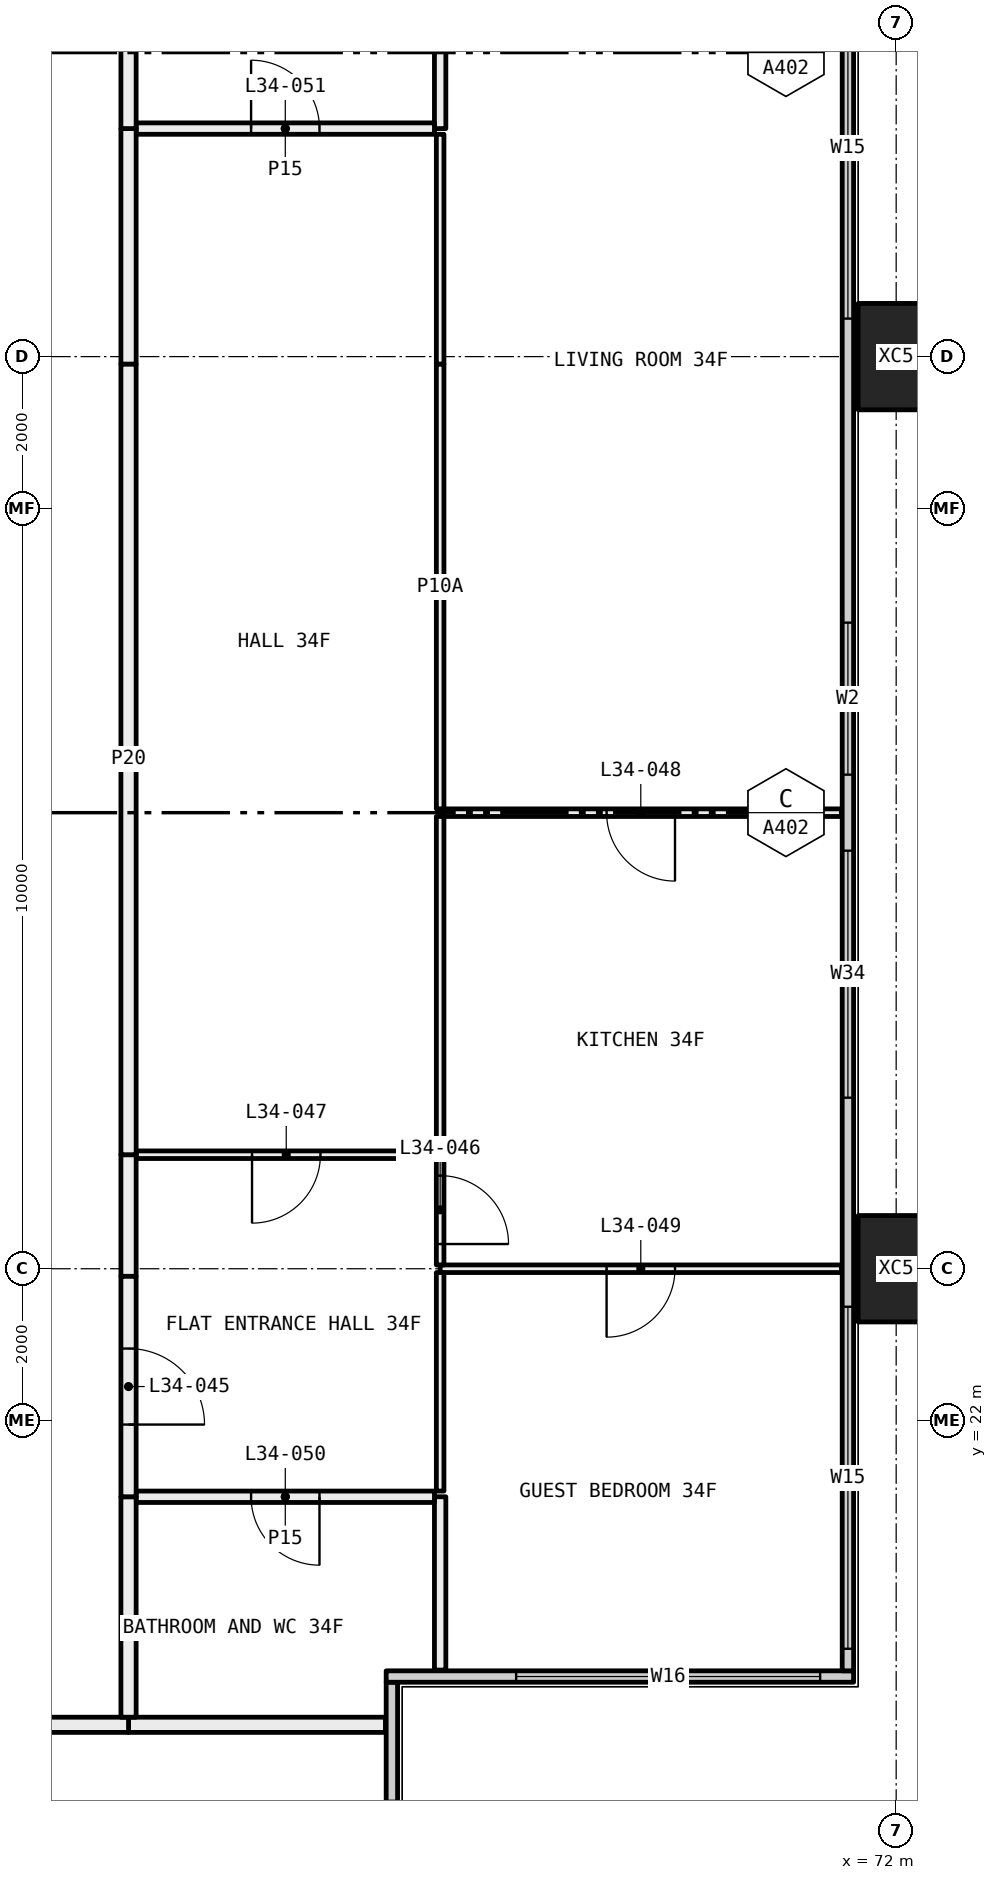
"""IFC4 building model, lengths in metres.
Left out: names, types, materials, properties, quantities, classifications, styles, units other than length and angle.
Written with IfcOpenShell. Run it as: python <this file> out.ifc"""

import sys

from ifc_helpers import new_model, si_unit, direction, frame, frame_2d, origin, origin_2d, place, context, subcontext, project, spatial, rectangle, hollow_rectangle, extrude, element, fill, save


model = new_model("IFC4")
c1 = context("Model", 3, precision=1e-05, world=origin(), true_north=direction((0.0, 1.0)))
c2 = subcontext(c1, "Body", "Model", "MODEL_VIEW")
j1 = project(units=[si_unit("LENGTHUNIT", "METRE"), si_unit("PLANEANGLEUNIT", "RADIAN")], contexts=[c1])
p1 = place(None, origin())
s1 = spatial("IfcSite", under=j1, at=p1, CompositionType="ELEMENT")
p2 = place(p1, origin())
s2 = spatial("IfcBuilding", under=s1, at=p2, CompositionType="ELEMENT")
p3 = place(p2, frame((0.0, 0.0, 131.1)))
s3 = spatial("IfcBuildingStorey", under=s2, at=p3, CompositionType="ELEMENT", Elevation=131.1)
for number, where, z_axis, x_axis in (
    (1, (72.0, 24.0, -0.4), (0.0, 0.0, 1.0), (0.0, 1.0, 0.0)),
    (2, (72.0, 36.0, -0.4), (0.0, 0.0, 1.0), (0.0, 1.0, 0.0)),
):
    element("IfcColumn", number, at=place(p3, frame(where, z_axis=z_axis, x_axis=x_axis)), inside=s3, PredefinedType="COLUMN", context=c2, shape_type="SweptSolid", body=[
        extrude(hollow_rectangle(XDim=1.4, YDim=1.0, WallThickness=0.055, at=origin_2d()), origin(), (0.0, 0.0, 1.0), 3.45),
    ])
p4 = place(p3, frame((65.365, 12.71, 0.0), z_axis=(0.0, 0.0, 1.0), x_axis=(0.0, 1.0, 0.0)))
e3 = element("IfcWall", 3, at=p4, inside=s3, PredefinedType="ELEMENTEDWALL", context=c2, shape_type="SweptSolid", body=[
    extrude(rectangle(XDim=5.85, YDim=0.15, at=frame_2d((2.925, 0.0))), origin(), (0.0, 0.0, 1.0), 3.05),
])
p5 = place(p4, frame((0.29, 0.0, 0.45)))
e4 = element("IfcOpeningElement", 4, at=p5, cuts=e3, PredefinedType="OPENING", context=c2, shape_type="SweptSolid", body=[
    extrude(rectangle(XDim=4.0, YDim=2.55, at=frame_2d((2.0, 1.275))), frame((0.0, 0.085, 0.0), z_axis=(0.0, -1.0, 0.0), x_axis=(1.0, 0.0, 0.0)), (0.0, 0.0, 1.0), 0.17),
])
p6 = place(p3, frame((65.29, 18.635, 0.0), z_axis=(0.0, 0.0, 1.0), x_axis=(1.0, 0.0, 0.0)))
e5 = element("IfcWall", 5, at=p6, inside=s3, PredefinedType="ELEMENTEDWALL", context=c2, shape_type="SweptSolid", body=[
    extrude(rectangle(XDim=6.15, YDim=0.15, at=frame_2d((3.075, 0.0))), origin(), (0.0, 0.0, 1.0), 3.05),
])
p7 = place(p6, frame((1.71, 0.0, 0.45)))
e6 = element("IfcOpeningElement", 6, at=p7, cuts=e5, PredefinedType="OPENING", context=c2, shape_type="SweptSolid", body=[
    extrude(rectangle(XDim=4.0, YDim=2.55, at=frame_2d((2.0, 1.275))), frame((0.0, 0.085, 0.0), z_axis=(0.0, -1.0, 0.0), x_axis=(1.0, 0.0, 0.0)), (0.0, 0.0, 1.0), 0.17),
])
p8 = place(p3, frame((71.365, 18.71, 0.0), z_axis=(0.0, 0.0, 1.0), x_axis=(0.0, 1.0, 0.0)))
e7 = element("IfcWall", 7, at=p8, inside=s3, PredefinedType="ELEMENTEDWALL", context=c2, shape_type="SweptSolid", body=[
    extrude(rectangle(XDim=22.58, YDim=0.15, at=frame_2d((11.29, 0.0))), origin(), (0.0, 0.0, 1.0), 3.05),
])
p9 = place(p8, frame((0.29, 0.0, 0.45)))
e8 = element("IfcOpeningElement", 8, at=p9, cuts=e7, PredefinedType="OPENING", context=c2, shape_type="SweptSolid", body=[
    extrude(rectangle(XDim=4.5, YDim=2.55, at=frame_2d((2.25, 1.275))), frame((0.0, 0.085, 0.0), z_axis=(0.0, -1.0, 0.0), x_axis=(1.0, 0.0, 0.0)), (0.0, 0.0, 1.0), 0.17),
])
p10 = place(p8, frame((7.54, 0.0, 0.45)))
e9 = element("IfcOpeningElement", 9, at=p10, cuts=e7, PredefinedType="OPENING", context=c2, shape_type="SweptSolid", body=[
    extrude(rectangle(XDim=3.25, YDim=2.55, at=frame_2d((1.625, 1.275))), frame((0.0, 0.085, 0.0), z_axis=(0.0, -1.0, 0.0), x_axis=(1.0, 0.0, 0.0)), (0.0, 0.0, 1.0), 0.17),
])
p11 = place(p8, frame((11.79, 0.0, 0.45)))
e10 = element("IfcOpeningElement", 10, at=p11, cuts=e7, PredefinedType="OPENING", context=c2, shape_type="SweptSolid", body=[
    extrude(rectangle(XDim=2.0, YDim=2.55, at=frame_2d((1.0, 1.275))), frame((0.0, 0.085, 0.0), z_axis=(0.0, -1.0, 0.0), x_axis=(1.0, 0.0, 0.0)), (0.0, 0.0, 1.0), 0.17),
])
p12 = place(p8, frame((17.79, 0.0, 0.45)))
e11 = element("IfcOpeningElement", 11, at=p12, cuts=e7, PredefinedType="OPENING", context=c2, shape_type="SweptSolid", body=[
    extrude(rectangle(XDim=4.5, YDim=2.55, at=frame_2d((2.25, 1.275))), frame((0.0, 0.085, 0.0), z_axis=(0.0, -1.0, 0.0), x_axis=(1.0, 0.0, 0.0)), (0.0, 0.0, 1.0), 0.17),
])
p13 = place(p3, frame((65.28, 18.0, 0.0), z_axis=(0.0, 0.0, 1.0), x_axis=(-1.0, 0.0, 0.0)))
e12 = element("IfcWall", 12, at=p13, inside=s3, PredefinedType="PARTITIONING", context=c2, shape_type="SweptSolid", body=[
    extrude(rectangle(XDim=3.38, YDim=0.2, at=frame_2d((1.69, 0.0))), origin(), (0.0, 0.0, 1.0), 3.05),
])
p14 = place(p3, frame((61.9, 18.0, 0.0), z_axis=(0.0, 0.0, 1.0), x_axis=(-1.0, 0.0, 0.0)))
e13 = element("IfcWall", 13, at=p14, inside=s3, PredefinedType="PARTITIONING", context=c2, shape_type="SweptSolid", body=[
    extrude(rectangle(XDim=1.9, YDim=0.2, at=frame_2d((0.95, 0.0))), origin(), (0.0, 0.0, 1.0), 3.05),
])
p15 = place(p3, frame((71.28, 24.0, 0.0), z_axis=(0.0, 0.0, 1.0), x_axis=(-1.0, 0.0, 0.0)))
e14 = element("IfcWall", 14, at=p15, inside=s3, PredefinedType="PARTITIONING", context=c2, shape_type="SweptSolid", body=[
    extrude(rectangle(XDim=5.28, YDim=0.1, at=frame_2d((2.64, 0.0))), origin(), (0.0, 0.0, 1.0), 2.45),
])
p16 = place(p15, frame((2.19, 0.0, 0.0)))
e15 = element("IfcOpeningElement", 15, at=p16, cuts=e14, PredefinedType="OPENING", context=c2, shape_type="SweptSolid", body=[
    extrude(rectangle(XDim=0.9, YDim=2.1, at=frame_2d((0.45, 1.05))), frame((0.0, 0.06, 0.0), z_axis=(0.0, -1.0, 0.0), x_axis=(1.0, 0.0, 0.0)), (0.0, 0.0, 1.0), 0.12),
])
p17 = place(p3, frame((66.0, 21.0, 0.0), z_axis=(0.0, 0.0, 1.0), x_axis=(0.0, -1.0, 0.0)))
e16 = element("IfcWall", 16, at=p17, inside=s3, PredefinedType="PARTITIONING", context=c2, shape_type="SweptSolid", body=[
    extrude(rectangle(XDim=2.28, YDim=0.15, at=frame_2d((1.14, 0.0))), origin(), (0.0, 0.0, 1.0), 3.05),
])
p18 = place(p3, frame((66.0, 23.95, 0.0), z_axis=(0.0, 0.0, 1.0), x_axis=(0.0, -1.0, 0.0)))
e17 = element("IfcWall", 17, at=p18, inside=s3, PredefinedType="PARTITIONING", context=c2, shape_type="SweptSolid", body=[
    extrude(rectangle(XDim=2.875, YDim=0.1, at=frame_2d((1.438, 0.0))), origin(), (0.0, 0.0, 1.0), 2.45),
])
p19 = place(p3, frame((71.28, 30.0, 0.0), z_axis=(0.0, 0.0, 1.0), x_axis=(-1.0, 0.0, 0.0)))
e18 = element("IfcWall", 18, at=p19, inside=s3, PredefinedType="PARTITIONING", context=c2, shape_type="SweptSolid", body=[
    extrude(rectangle(XDim=5.28, YDim=0.1, at=frame_2d((2.64, 0.0))), origin(), (0.0, 0.0, 1.0), 3.05),
])
p20 = place(p19, frame((2.19, 0.0, 0.0)))
e19 = element("IfcOpeningElement", 19, at=p20, cuts=e18, PredefinedType="OPENING", context=c2, shape_type="SweptSolid", body=[
    extrude(rectangle(XDim=0.9, YDim=2.1, at=frame_2d((0.45, 1.05))), frame((0.0, 0.06, 0.0), z_axis=(0.0, -1.0, 0.0), x_axis=(1.0, 0.0, 0.0)), (0.0, 0.0, 1.0), 0.12),
])
p21 = place(p3, frame((66.0, 25.5, 0.0), z_axis=(0.0, 0.0, 1.0), x_axis=(0.0, -1.0, 0.0)))
e20 = element("IfcWall", 20, at=p21, inside=s3, PredefinedType="PARTITIONING", context=c2, shape_type="SweptSolid", body=[
    extrude(rectangle(XDim=1.45, YDim=0.1, at=frame_2d((0.725, 0.0))), origin(), (0.0, 0.0, 1.0), 2.45),
])
p22 = place(p21, frame((0.275, 0.0, 0.0)))
e21 = element("IfcOpeningElement", 21, at=p22, cuts=e20, PredefinedType="OPENING", context=c2, shape_type="SweptSolid", body=[
    extrude(rectangle(XDim=0.9, YDim=2.1, at=frame_2d((0.45, 1.05))), frame((0.0, 0.06, 0.0), z_axis=(0.0, -1.0, 0.0), x_axis=(1.0, 0.0, 0.0)), (0.0, 0.0, 1.0), 0.12),
])
p23 = place(p3, frame((66.0, 29.95, 0.0), z_axis=(0.0, 0.0, 1.0), x_axis=(0.0, -1.0, 0.0)))
e22 = element("IfcWall", 22, at=p23, inside=s3, PredefinedType="PARTITIONING", context=c2, shape_type="SweptSolid", body=[
    extrude(rectangle(XDim=4.45, YDim=0.1, at=frame_2d((2.225, 0.0))), origin(), (0.0, 0.0, 1.0), 3.05),
])
p24 = place(p3, frame((66.0, 38.925, 0.0), z_axis=(0.0, 0.0, 1.0), x_axis=(0.0, -1.0, 0.0)))
e23 = element("IfcWall", 23, at=p24, inside=s3, PredefinedType="PARTITIONING", context=c2, shape_type="SweptSolid", body=[
    extrude(rectangle(XDim=3.025, YDim=0.1, at=frame_2d((1.513, 0.0))), origin(), (0.0, 0.0, 1.0), 2.45),
])
p25 = place(p3, frame((66.0, 35.9, 0.0), z_axis=(0.0, 0.0, 1.0), x_axis=(0.0, -1.0, 0.0)))
e24 = element("IfcWall", 24, at=p25, inside=s3, PredefinedType="PARTITIONING", context=c2, shape_type="SweptSolid", body=[
    extrude(rectangle(XDim=5.85, YDim=0.1, at=frame_2d((2.925, 0.0))), origin(), (0.0, 0.0, 1.0), 3.05),
])
p26 = place(p3, frame((66.0, 41.28, 0.0), z_axis=(0.0, 0.0, 1.0), x_axis=(0.0, -1.0, 0.0)))
e25 = element("IfcWall", 25, at=p26, inside=s3, PredefinedType="PARTITIONING", context=c2, shape_type="SweptSolid", body=[
    extrude(rectangle(XDim=2.28, YDim=0.15, at=frame_2d((1.14, 0.0))), origin(), (0.0, 0.0, 1.0), 3.05),
])
p27 = place(p3, frame((65.925, 21.0, 0.0), z_axis=(0.0, 0.0, 1.0), x_axis=(-1.0, 0.0, 0.0)))
e26 = element("IfcWall", 26, at=p27, inside=s3, PredefinedType="PARTITIONING", context=c2, shape_type="SweptSolid", body=[
    extrude(rectangle(XDim=3.925, YDim=0.15, at=frame_2d((1.962, 0.0))), origin(), (0.0, 0.0, 1.0), 3.05),
])
p28 = place(p27, frame((1.512, 0.0, 0.0)))
e27 = element("IfcOpeningElement", 27, at=p28, cuts=e26, PredefinedType="OPENING", context=c2, shape_type="SweptSolid", body=[
    extrude(rectangle(XDim=0.9, YDim=2.1, at=frame_2d((0.45, 1.05))), frame((0.0, 0.085, 0.0), z_axis=(0.0, -1.0, 0.0), x_axis=(1.0, 0.0, 0.0)), (0.0, 0.0, 1.0), 0.17),
])
p29 = place(p3, frame((61.9, 21.0, 0.0), z_axis=(0.0, 0.0, 1.0), x_axis=(0.0, -1.0, 0.0)))
e28 = element("IfcWall", 28, at=p29, inside=s3, PredefinedType="PARTITIONING", context=c2, shape_type="SweptSolid", body=[
    extrude(rectangle(XDim=2.9, YDim=0.2, at=frame_2d((1.45, 0.0))), origin(), (0.0, 0.0, 1.0), 3.05),
])
p30 = place(p3, frame((65.95, 25.5, 0.0), z_axis=(0.0, 0.0, 1.0), x_axis=(-1.0, 0.0, 0.0)))
e29 = element("IfcWall", 29, at=p30, inside=s3, PredefinedType="PARTITIONING", context=c2, shape_type="SweptSolid", body=[
    extrude(rectangle(XDim=3.95, YDim=0.1, at=frame_2d((1.975, 0.0))), origin(), (0.0, 0.0, 1.0), 3.05),
])
p31 = place(p30, frame((1.525, 0.0, 0.0)))
e30 = element("IfcOpeningElement", 30, at=p31, cuts=e29, PredefinedType="OPENING", context=c2, shape_type="SweptSolid", body=[
    extrude(rectangle(XDim=0.9, YDim=2.1, at=frame_2d((0.45, 1.05))), frame((0.0, 0.06, 0.0), z_axis=(0.0, -1.0, 0.0), x_axis=(1.0, 0.0, 0.0)), (0.0, 0.0, 1.0), 0.12),
])
p32 = place(p3, frame((61.9, 25.5, 0.0), z_axis=(0.0, 0.0, 1.0), x_axis=(0.0, -1.0, 0.0)))
e31 = element("IfcWall", 31, at=p32, inside=s3, PredefinedType="PARTITIONING", context=c2, shape_type="SweptSolid", body=[
    extrude(rectangle(XDim=1.6, YDim=0.2, at=frame_2d((0.8, 0.0))), origin(), (0.0, 0.0, 1.0), 2.45),
])
p33 = place(p3, frame((61.9, 23.9, 0.0), z_axis=(0.0, 0.0, 1.0), x_axis=(0.0, -1.0, 0.0)))
e32 = element("IfcWall", 32, at=p33, inside=s3, PredefinedType="PARTITIONING", context=c2, shape_type="SweptSolid", body=[
    extrude(rectangle(XDim=2.9, YDim=0.2, at=frame_2d((1.45, 0.0))), origin(), (0.0, 0.0, 1.0), 3.05),
])
p34 = place(p33, frame((0.95, 0.0, 0.0)))
e33 = element("IfcOpeningElement", 33, at=p34, cuts=e32, PredefinedType="OPENING", context=c2, shape_type="SweptSolid", body=[
    extrude(rectangle(XDim=1.0, YDim=2.1, at=frame_2d((0.5, 1.05))), frame((0.0, 0.11, 0.0), z_axis=(0.0, -1.0, 0.0), x_axis=(1.0, 0.0, 0.0)), (0.0, 0.0, 1.0), 0.22),
])
p35 = place(p3, frame((65.925, 39.0, 0.0), z_axis=(0.0, 0.0, 1.0), x_axis=(-1.0, 0.0, 0.0)))
e34 = element("IfcWall", 34, at=p35, inside=s3, PredefinedType="PARTITIONING", context=c2, shape_type="SweptSolid", body=[
    extrude(rectangle(XDim=3.925, YDim=0.15, at=frame_2d((1.962, 0.0))), origin(), (0.0, 0.0, 1.0), 3.05),
])
p36 = place(p35, frame((1.512, 0.0, 0.0)))
e35 = element("IfcOpeningElement", 35, at=p36, cuts=e34, PredefinedType="OPENING", context=c2, shape_type="SweptSolid", body=[
    extrude(rectangle(XDim=0.9, YDim=2.1, at=frame_2d((0.45, 1.05))), frame((0.0, 0.085, 0.0), z_axis=(0.0, -1.0, 0.0), x_axis=(1.0, 0.0, 0.0)), (0.0, 0.0, 1.0), 0.17),
])
p37 = place(p3, frame((61.9, 39.0, 0.0), z_axis=(0.0, 0.0, 1.0), x_axis=(0.0, -1.0, 0.0)))
e36 = element("IfcWall", 36, at=p37, inside=s3, PredefinedType="PARTITIONING", context=c2, shape_type="SweptSolid", body=[
    extrude(rectangle(XDim=3.1, YDim=0.2, at=frame_2d((1.55, 0.0))), origin(), (0.0, 0.0, 1.0), 2.45),
])
p38 = place(p3, frame((61.9, 35.9, 0.0), z_axis=(0.0, 0.0, 1.0), x_axis=(0.0, -1.0, 0.0)))
e37 = element("IfcWall", 37, at=p38, inside=s3, PredefinedType="PARTITIONING", context=c2, shape_type="SweptSolid", body=[
    extrude(rectangle(XDim=10.4, YDim=0.2, at=frame_2d((5.2, 0.0))), origin(), (0.0, 0.0, 1.0), 3.05),
])
p39 = place(p3, frame((61.9, 41.9, 0.0), z_axis=(0.0, 0.0, 1.0), x_axis=(0.0, -1.0, 0.0)))
e38 = element("IfcWall", 38, at=p39, inside=s3, PredefinedType="PARTITIONING", context=c2, shape_type="SweptSolid", body=[
    extrude(rectangle(XDim=2.9, YDim=0.2, at=frame_2d((1.45, 0.0))), origin(), (0.0, 0.0, 1.0), 3.05),
])
p40 = place(p7, origin())
e39 = element("IfcWindow", 39, at=p40, inside=s3, PartitioningType="SINGLE_PANEL", PredefinedType="WINDOW", context=c2, shape_type="SweptSolid", body=[
    extrude(rectangle(XDim=4.0, YDim=2.55, at=frame_2d((2.0, 1.275))), frame((0.0, 0.03, 0.0), z_axis=(0.0, -1.0, 0.0), x_axis=(1.0, 0.0, 0.0)), (0.0, 0.0, 1.0), 0.06),
])
fill(e6, e39)
p41 = place(p9, origin())
e40 = element("IfcWindow", 40, at=p41, inside=s3, PartitioningType="SINGLE_PANEL", PredefinedType="WINDOW", context=c2, shape_type="SweptSolid", body=[
    extrude(rectangle(XDim=4.5, YDim=2.55, at=frame_2d((2.25, 1.275))), frame((0.0, 0.03, 0.0), z_axis=(0.0, -1.0, 0.0), x_axis=(1.0, 0.0, 0.0)), (0.0, 0.0, 1.0), 0.06),
])
fill(e8, e40)
p42 = place(p10, origin())
e41 = element("IfcWindow", 41, at=p42, inside=s3, PartitioningType="SINGLE_PANEL", PredefinedType="WINDOW", context=c2, shape_type="SweptSolid", body=[
    extrude(rectangle(XDim=3.25, YDim=2.55, at=frame_2d((1.625, 1.275))), frame((0.0, 0.03, 0.0), z_axis=(0.0, -1.0, 0.0), x_axis=(1.0, 0.0, 0.0)), (0.0, 0.0, 1.0), 0.06),
])
fill(e9, e41)
p43 = place(p11, origin())
e42 = element("IfcWindow", 42, at=p43, inside=s3, PartitioningType="SINGLE_PANEL", PredefinedType="WINDOW", context=c2, shape_type="SweptSolid", body=[
    extrude(rectangle(XDim=2.0, YDim=2.55, at=frame_2d((1.0, 1.275))), frame((0.0, 0.03, 0.0), z_axis=(0.0, -1.0, 0.0), x_axis=(1.0, 0.0, 0.0)), (0.0, 0.0, 1.0), 0.06),
])
fill(e10, e42)
p44 = place(p12, origin())
e43 = element("IfcWindow", 43, at=p44, inside=s3, PartitioningType="SINGLE_PANEL", PredefinedType="WINDOW", context=c2, shape_type="SweptSolid", body=[
    extrude(rectangle(XDim=4.5, YDim=2.55, at=frame_2d((2.25, 1.275))), frame((0.0, 0.03, 0.0), z_axis=(0.0, -1.0, 0.0), x_axis=(1.0, 0.0, 0.0)), (0.0, 0.0, 1.0), 0.06),
])
fill(e11, e43)
p45 = place(p34, origin())
e44 = element("IfcDoor", 44, at=p45, inside=s3, OperationType="SINGLE_SWING_LEFT", PredefinedType="DOOR", context=c2, shape_type="SweptSolid", body=[
    extrude(rectangle(XDim=1.0, YDim=2.1, at=frame_2d((0.5, 1.05))), frame((0.0, 0.025, 0.0), z_axis=(0.0, -1.0, 0.0), x_axis=(1.0, 0.0, 0.0)), (0.0, 0.0, 1.0), 0.05),
])
fill(e33, e44)
p46 = place(p22, origin())
e45 = element("IfcDoor", 45, at=p46, inside=s3, OperationType="SINGLE_SWING_LEFT", PredefinedType="DOOR", context=c2, shape_type="SweptSolid", body=[
    extrude(rectangle(XDim=0.9, YDim=2.1, at=frame_2d((0.45, 1.05))), frame((0.0, 0.025, 0.0), z_axis=(0.0, -1.0, 0.0), x_axis=(1.0, 0.0, 0.0)), (0.0, 0.0, 1.0), 0.05),
])
fill(e21, e45)
p47 = place(p31, origin())
e46 = element("IfcDoor", 46, at=p47, inside=s3, OperationType="SINGLE_SWING_LEFT", PredefinedType="DOOR", context=c2, shape_type="SweptSolid", body=[
    extrude(rectangle(XDim=0.9, YDim=2.1, at=frame_2d((0.45, 1.05))), frame((0.0, 0.025, 0.0), z_axis=(0.0, -1.0, 0.0), x_axis=(1.0, 0.0, 0.0)), (0.0, 0.0, 1.0), 0.05),
])
fill(e30, e46)
p48 = place(p20, origin())
e47 = element("IfcDoor", 47, at=p48, inside=s3, OperationType="SINGLE_SWING_RIGHT", PredefinedType="DOOR", context=c2, shape_type="SweptSolid", body=[
    extrude(rectangle(XDim=0.9, YDim=2.1, at=frame_2d((0.45, 1.05))), frame((0.0, 0.025, 0.0), z_axis=(0.0, -1.0, 0.0), x_axis=(1.0, 0.0, 0.0)), (0.0, 0.0, 1.0), 0.05),
])
fill(e19, e47)
p49 = place(p16, origin())
e48 = element("IfcDoor", 48, at=p49, inside=s3, OperationType="SINGLE_SWING_LEFT", PredefinedType="DOOR", context=c2, shape_type="SweptSolid", body=[
    extrude(rectangle(XDim=0.9, YDim=2.1, at=frame_2d((0.45, 1.05))), frame((0.0, 0.025, 0.0), z_axis=(0.0, -1.0, 0.0), x_axis=(1.0, 0.0, 0.0)), (0.0, 0.0, 1.0), 0.05),
])
fill(e15, e48)
p50 = place(p28, origin())
e49 = element("IfcDoor", 49, at=p50, inside=s3, OperationType="SINGLE_SWING_RIGHT", PredefinedType="DOOR", context=c2, shape_type="SweptSolid", body=[
    extrude(rectangle(XDim=0.9, YDim=2.1, at=frame_2d((0.45, 1.05))), frame((0.0, 0.025, 0.0), z_axis=(0.0, -1.0, 0.0), x_axis=(1.0, 0.0, 0.0)), (0.0, 0.0, 1.0), 0.05),
])
fill(e27, e49)
p51 = place(p36, frame((0.9, 0.0, 0.0), x_axis=(-1.0, 0.0, 0.0)))
e50 = element("IfcDoor", 50, at=p51, inside=s3, OperationType="SINGLE_SWING_RIGHT", PredefinedType="DOOR", context=c2, shape_type="SweptSolid", body=[
    extrude(rectangle(XDim=0.9, YDim=2.1, at=frame_2d((0.45, 1.05))), frame((0.0, 0.025, 0.0), z_axis=(0.0, -1.0, 0.0), x_axis=(1.0, 0.0, 0.0)), (0.0, 0.0, 1.0), 0.05),
])
fill(e35, e50)
save(model, sys.argv[1])
